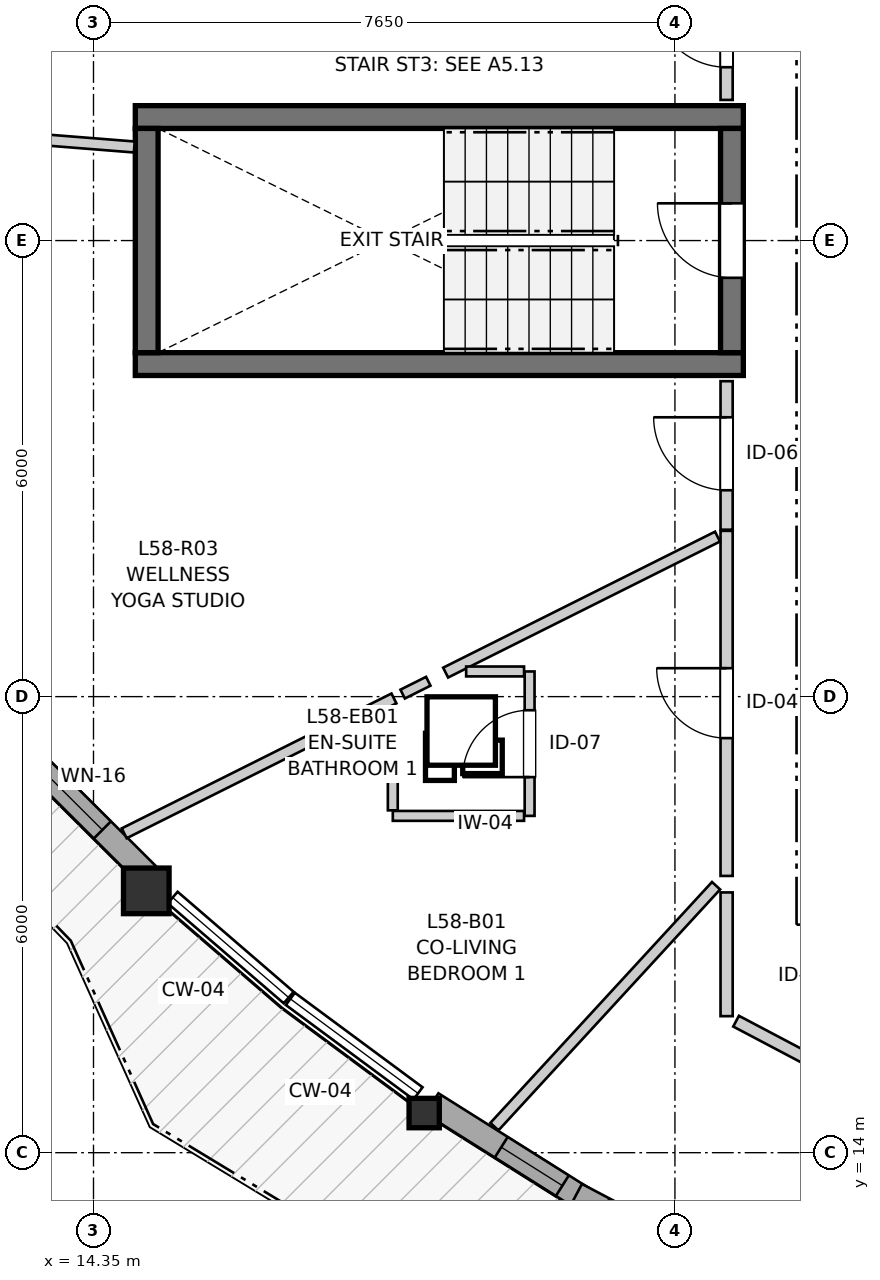
"""IFC4 building model, lengths in metres.
Left out: names, types, materials, properties, quantities, classifications, styles, units other than length and angle.
Written with IfcOpenShell. Run it as: python <this file> out.ifc"""

import sys

from ifc_helpers import new_model, si_unit, direction, frame, frame_2d, origin, origin_2d, place, context, subcontext, project, spatial, rectangle, i_section, extrude, source, transform, mapped, element, fill, save


model = new_model("IFC4")
c1 = context("Model", 3, precision=1e-05, world=origin(), true_north=direction((0.0, 1.0)))
c2 = subcontext(c1, "Body", "Model", "MODEL_VIEW")
j1 = project(units=[si_unit("LENGTHUNIT", "METRE"), si_unit("PLANEANGLEUNIT", "RADIAN")], contexts=[c1])
p1 = place(None, origin())
s1 = spatial("IfcSite", under=j1, at=p1, CompositionType="ELEMENT")
p2 = place(p1, origin())
s2 = spatial("IfcBuilding", under=s1, at=p2, CompositionType="ELEMENT")
p3 = place(p2, frame((0.0, 0.0, 195.6)))
s3 = spatial("IfcBuildingStorey", under=s2, at=p3, CompositionType="ELEMENT", Elevation=195.6)
for number, where, z_axis, x_axis in (
    (1, (14.9, 24.375, 0.0), (0.0, 0.0, 1.0), (1.0, 0.0, 0.0)),
    (2, (22.9, 27.625, 0.0), (0.0, 0.0, 1.0), (-1.0, 0.0, 0.0)),
):
    element("IfcWall", number, at=place(p3, frame(where, z_axis=z_axis, x_axis=x_axis)), inside=s3, PredefinedType="SHEAR", context=c2, shape_type="SweptSolid", body=[
        extrude(rectangle(XDim=8.0, YDim=0.3, at=frame_2d((4.0, 0.0))), origin(), (0.0, 0.0, 1.0), 2.96),
    ])
p4 = place(p3, frame((15.05, 27.475, 0.0), z_axis=(0.0, 0.0, 1.0), x_axis=(0.0, -1.0, 0.0)))
e3 = element("IfcWall", 3, at=p4, inside=s3, PredefinedType="SHEAR", context=c2, shape_type="SweptSolid", body=[
    extrude(rectangle(XDim=2.95, YDim=0.3, at=frame_2d((1.475, 0.0))), origin(), (0.0, 0.0, 1.0), 2.96),
])
p5 = place(p3, frame((22.75, 24.525, 0.0), z_axis=(0.0, 0.0, 1.0), x_axis=(0.0, 1.0, 0.0)))
e4 = element("IfcWall", 4, at=p5, inside=s3, PredefinedType="SHEAR", context=c2, shape_type="SweptSolid", body=[
    extrude(rectangle(XDim=2.95, YDim=0.3, at=frame_2d((1.475, 0.0))), origin(), (0.0, 0.0, 1.0), 2.96),
])
p6 = place(p5, frame((0.985, 0.0, 0.0)))
e5 = element("IfcOpeningElement", 5, at=p6, cuts=e4, PredefinedType="OPENING", context=c2, shape_type="SweptSolid", body=[
    extrude(rectangle(XDim=0.98, YDim=2.15, at=frame_2d((0.49, 1.075))), frame((0.0, 0.16, 0.0), z_axis=(0.0, -1.0, 0.0), x_axis=(1.0, 0.0, 0.0)), (0.0, 0.0, 1.0), 0.32),
])
m1 = source(origin(), c2, "Body", "SweptSolid", [
    extrude(rectangle(XDim=0.6, YDim=0.6, at=origin_2d()), origin(), (0.0, 0.0, 1.0), 2.96),
])
p7 = place(p3, frame((15.044, 17.445, 0.0), z_axis=(0.0, 0.0, 1.0), x_axis=(1.0, 0.0, 0.0)))
e6 = element("IfcColumn", 6, at=p7, inside=s3, PredefinedType="COLUMN", context=c2, shape_type="MappedRepresentation", body=[
    mapped(m1, transform((0.0, 0.0, 0.0), x_axis=(1.0, 0.0, 0.0), y_axis=(0.0, 1.0, 0.0), z_axis=(0.0, 0.0, 1.0), scale=1.0)),
])
m2 = source(origin(), c2, "Body", "SweptSolid", [
    extrude(i_section(OverallWidth=0.398, OverallDepth=0.387, WebThickness=0.019, FlangeThickness=0.03, FilletRadius=0.015, at=origin_2d()), origin(), (0.0, 0.0, 1.0), 2.96),
])
p8 = place(p3, frame((18.701, 14.521, 0.0), z_axis=(0.0, 0.0, 1.0), x_axis=(1.0, 0.0, 0.0)))
e7 = element("IfcColumn", 7, at=p8, inside=s3, PredefinedType="PILASTER", context=c2, shape_type="MappedRepresentation", body=[
    mapped(m2, transform((0.0, 0.0, 0.0), x_axis=(1.0, 0.0, 0.0), y_axis=(0.0, 1.0, 0.0), z_axis=(0.0, 0.0, 1.0), scale=1.0)),
])
p9 = place(p3, frame((13.434, 19.275, 0.0), z_axis=(0.0, 0.0, 1.0), x_axis=(0.708408377073, -0.705802784985, 0.0)))
e8 = element("IfcWall", 8, at=p9, inside=s3, PredefinedType="SOLIDWALL", context=c2, shape_type="SweptSolid", body=[
    extrude(rectangle(XDim=2.343, YDim=0.32, at=frame_2d((1.171, 0.0))), origin(), (0.0, 0.0, 1.0), 2.58),
])
p10 = place(p9, frame((0.308, 0.0, 0.82)))
e9 = element("IfcOpeningElement", 9, at=p10, cuts=e8, PredefinedType="OPENING", context=c2, shape_type="SweptSolid", body=[
    extrude(rectangle(XDim=1.15, YDim=1.2, at=frame_2d((0.575, 0.6))), frame((0.0, 0.17, 0.0), z_axis=(0.0, -1.0, 0.0), x_axis=(1.0, 0.0, 0.0)), (0.0, 0.0, 1.0), 0.34),
])
p11 = place(p3, frame((18.803, 14.646, 0.0), z_axis=(0.0, 0.0, 1.0), x_axis=(0.846390024768, -0.532563541724, 0.0)))
e10 = element("IfcWall", 10, at=p11, inside=s3, PredefinedType="SOLIDWALL", context=c2, shape_type="SweptSolid", body=[
    extrude(rectangle(XDim=2.334, YDim=0.32, at=frame_2d((1.167, 0.0))), origin(), (0.0, 0.0, 1.0), 2.58),
])
p12 = place(p11, frame((1.078, 0.0, 0.82)))
e11 = element("IfcOpeningElement", 11, at=p12, cuts=e10, PredefinedType="OPENING", context=c2, shape_type="SweptSolid", body=[
    extrude(rectangle(XDim=0.95, YDim=1.35, at=frame_2d((0.475, 0.675))), frame((0.0, 0.17, 0.0), z_axis=(0.0, -1.0, 0.0), x_axis=(1.0, 0.0, 0.0)), (0.0, 0.0, 1.0), 0.34),
])
p13 = place(p3, frame((20.702, 13.448, 0.0), z_axis=(0.0, 0.0, 1.0), x_axis=(0.884374859293, -0.466777364758, 0.0)))
e12 = element("IfcWall", 12, at=p13, inside=s3, PredefinedType="SOLIDWALL", context=c2, shape_type="SweptSolid", body=[
    extrude(rectangle(XDim=2.264, YDim=0.32, at=frame_2d((1.132, 0.0))), origin(), (0.0, 0.0, 1.0), 2.58),
])
p14 = place(p13, frame((0.412, 0.0, 0.82)))
e13 = element("IfcOpeningElement", 13, at=p14, cuts=e12, PredefinedType="OPENING", context=c2, shape_type="SweptSolid", body=[
    extrude(rectangle(XDim=1.45, YDim=1.25, at=frame_2d((0.725, 0.625))), frame((0.0, 0.17, 0.0), z_axis=(0.0, -1.0, 0.0), x_axis=(1.0, 0.0, 0.0)), (0.0, 0.0, 1.0), 0.34),
])
p15 = place(p3, frame((22.68, 17.641, 0.0), z_axis=(0.0, 0.0, 1.0), x_axis=(0.0, 1.0, 0.0)))
e14 = element("IfcWall", 14, at=p15, inside=s3, PredefinedType="PARTITIONING", context=c2, shape_type="SweptSolid", body=[
    extrude(rectangle(XDim=4.54, YDim=0.16, at=frame_2d((2.27, 0.0))), origin(), (0.0, 0.0, 1.0), 2.96),
])
p16 = place(p15, frame((1.813, 0.0, 0.0)))
e15 = element("IfcOpeningElement", 15, at=p16, cuts=e14, PredefinedType="OPENING", context=c2, shape_type="SweptSolid", body=[
    extrude(rectangle(XDim=0.92, YDim=2.1, at=frame_2d((0.46, 1.05))), frame((0.0, 0.09, 0.0), z_axis=(0.0, -1.0, 0.0), x_axis=(1.0, 0.0, 0.0)), (0.0, 0.0, 1.0), 0.18),
])
p17 = place(p3, frame((22.68, 22.196, 0.0), z_axis=(0.0, 0.0, 1.0), x_axis=(0.0, 1.0, 0.0)))
e16 = element("IfcWall", 16, at=p17, inside=s3, PredefinedType="PARTITIONING", context=c2, shape_type="SweptSolid", body=[
    extrude(rectangle(XDim=1.954, YDim=0.16, at=frame_2d((0.977, 0.0))), origin(), (0.0, 0.0, 1.0), 2.96),
])
p18 = place(p17, frame((0.519, 0.0, 0.0)))
e17 = element("IfcOpeningElement", 17, at=p18, cuts=e16, PredefinedType="OPENING", context=c2, shape_type="SweptSolid", body=[
    extrude(rectangle(XDim=0.96, YDim=2.1, at=frame_2d((0.48, 1.05))), frame((0.0, 0.09, 0.0), z_axis=(0.0, -1.0, 0.0), x_axis=(1.0, 0.0, 0.0)), (0.0, 0.0, 1.0), 0.18),
])
p19 = place(p3, frame((20.088, 18.431, 0.0), z_axis=(0.0, 0.0, 1.0), x_axis=(0.0, 1.0, 0.0)))
e18 = element("IfcWall", 18, at=p19, inside=s3, PredefinedType="PARTITIONING", context=c2, shape_type="SweptSolid", body=[
    extrude(rectangle(XDim=1.9, YDim=0.13, at=frame_2d((0.95, 0.0))), origin(), (0.0, 0.0, 1.0), 2.96),
])
p20 = place(p19, frame((0.51, 0.0, 0.0)))
e19 = element("IfcOpeningElement", 19, at=p20, cuts=e18, PredefinedType="OPENING", context=c2, shape_type="SweptSolid", body=[
    extrude(rectangle(XDim=0.88, YDim=2.05, at=frame_2d((0.44, 1.025))), frame((0.0, 0.075, 0.0), z_axis=(0.0, -1.0, 0.0), x_axis=(1.0, 0.0, 0.0)), (0.0, 0.0, 1.0), 0.15),
])
p21 = place(p3, frame((22.68, 27.85, 0.0), z_axis=(0.0, 0.0, 1.0), x_axis=(0.0, 1.0, 0.0)))
e20 = element("IfcWall", 20, at=p21, inside=s3, PredefinedType="PARTITIONING", context=c2, shape_type="SweptSolid", body=[
    extrude(rectangle(XDim=1.731, YDim=0.16, at=frame_2d((0.865, 0.0))), origin(), (0.0, 0.0, 1.0), 2.96),
])
p22 = place(p21, frame((0.43, 0.0, 0.0)))
e21 = element("IfcOpeningElement", 21, at=p22, cuts=e20, PredefinedType="OPENING", context=c2, shape_type="SweptSolid", body=[
    extrude(rectangle(XDim=0.96, YDim=2.1, at=frame_2d((0.48, 1.05))), frame((0.0, 0.09, 0.0), z_axis=(0.0, -1.0, 0.0), x_axis=(1.0, 0.0, 0.0)), (0.0, 0.0, 1.0), 0.18),
])
p23 = place(p3, frame((9.473, 27.661, 0.0), z_axis=(0.0, 0.0, 1.0), x_axis=(0.996864548282, -0.079126938392, 0.0)))
e22 = element("IfcWall", 22, at=p23, inside=s3, PredefinedType="PARTITIONING", context=c2, shape_type="SweptSolid", body=[
    extrude(rectangle(XDim=5.43, YDim=0.145, at=frame_2d((2.715, 0.0))), origin(), (0.0, 0.0, 1.0), 2.96),
])
p24 = place(p3, frame((19.625, 14.343, 0.0), z_axis=(0.0, 0.0, 1.0), x_axis=(0.677104421975, 0.735886949023, 0.0)))
e23 = element("IfcWall", 23, at=p24, inside=s3, PredefinedType="PARTITIONING", context=c2, shape_type="SweptSolid", body=[
    extrude(rectangle(XDim=4.307, YDim=0.145, at=frame_2d((2.153, 0.0))), origin(), (0.0, 0.0, 1.0), 2.96),
])
p25 = place(p3, frame((18.983, 20.316, 0.0), z_axis=(0.0, 0.0, 1.0), x_axis=(0.894366146285, 0.447335664104, 0.0)))
e24 = element("IfcWall", 24, at=p25, inside=s3, PredefinedType="PARTITIONING", context=c2, shape_type="SweptSolid", body=[
    extrude(rectangle(XDim=4.0, YDim=0.145, at=frame_2d((2.0, 0.0))), origin(), (0.0, 0.0, 1.0), 2.96),
])
p26 = place(p3, frame((14.754, 18.202, 0.0), z_axis=(0.0, 0.0, 1.0), x_axis=(0.894464106055, 0.44713975777, 0.0)))
e25 = element("IfcWall", 25, at=p26, inside=s3, PredefinedType="PARTITIONING", context=c2, shape_type="SweptSolid", body=[
    extrude(rectangle(XDim=3.968, YDim=0.145, at=frame_2d((1.984, 0.0))), origin(), (0.0, 0.0, 1.0), 2.96),
])
p27 = place(p3, frame((22.68, 15.796, 0.0), z_axis=(0.0, 0.0, 1.0), x_axis=(0.0, 1.0, 0.0)))
e26 = element("IfcWall", 26, at=p27, inside=s3, PredefinedType="PARTITIONING", context=c2, shape_type="SweptSolid", body=[
    extrude(rectangle(XDim=1.628, YDim=0.16, at=frame_2d((0.814, 0.0))), origin(), (0.0, 0.0, 1.0), 2.96),
])
p28 = place(p3, frame((18.288, 18.431, 0.0), z_axis=(0.0, 0.0, 1.0), x_axis=(1.0, 0.0, 0.0)))
e27 = element("IfcWall", 27, at=p28, inside=s3, PredefinedType="PARTITIONING", context=c2, shape_type="SweptSolid", body=[
    extrude(rectangle(XDim=1.727, YDim=0.13, at=frame_2d((0.863, 0.0))), origin(), (0.0, 0.0, 1.0), 2.96),
])
p29 = place(p3, frame((22.804, 15.73, 0.0), z_axis=(0.0, 0.0, 1.0), x_axis=(0.884376976103, -0.466773354143, 0.0)))
e28 = element("IfcWall", 28, at=p29, inside=s3, PredefinedType="PARTITIONING", context=c2, shape_type="SweptSolid", body=[
    extrude(rectangle(XDim=1.44, YDim=0.16, at=frame_2d((0.72, 0.0))), origin(), (0.0, 0.0, 1.0), 2.96),
])
p30 = place(p3, frame((18.288, 18.504, 0.0), z_axis=(0.0, 0.0, 1.0), x_axis=(0.0, 1.0, 0.0)))
e29 = element("IfcWall", 29, at=p30, inside=s3, PredefinedType="PARTITIONING", context=c2, shape_type="SweptSolid", body=[
    extrude(rectangle(XDim=1.344, YDim=0.13, at=frame_2d((0.672, 0.0))), origin(), (0.0, 0.0, 1.0), 2.96),
])
p31 = place(p3, frame((19.253, 20.331, 0.0), z_axis=(0.0, 0.0, 1.0), x_axis=(1.0, 0.0, 0.0)))
e30 = element("IfcWall", 30, at=p31, inside=s3, PredefinedType="PARTITIONING", context=c2, shape_type="SweptSolid", body=[
    extrude(rectangle(XDim=0.762, YDim=0.13, at=frame_2d((0.381, 0.0))), origin(), (0.0, 0.0, 1.0), 2.96),
])
p32 = place(p3, frame((18.417, 20.033, 0.0), z_axis=(0.0, 0.0, 1.0), x_axis=(0.894427191, 0.4472135955, 0.0)))
e31 = element("IfcWall", 31, at=p32, inside=s3, PredefinedType="PARTITIONING", context=c2, shape_type="SweptSolid", body=[
    extrude(rectangle(XDim=0.377, YDim=0.13, at=frame_2d((0.188, 0.0))), origin(), (0.0, 0.0, 1.0), 2.96),
])
m3 = source(origin(), c2, "Body", "SweptSolid", [
    extrude(rectangle(XDim=1.15, YDim=1.2, at=frame_2d((0.575, 0.6))), frame((0.0, 0.03, 0.0), z_axis=(0.0, -1.0, 0.0), x_axis=(1.0, 0.0, 0.0)), (0.0, 0.0, 1.0), 0.06),
])
p33 = place(p10, origin())
e32 = element("IfcWindow", 32, at=p33, inside=s3, PartitioningType="SINGLE_PANEL", PredefinedType="WINDOW", context=c2, shape_type="MappedRepresentation", body=[
    mapped(m3, transform((0.0, 0.0, 0.0), x_axis=(1.0, 0.0, 0.0), y_axis=(0.0, 1.0, 0.0), z_axis=(0.0, 0.0, 1.0), scale=1.0)),
])
fill(e9, e32)
m4 = source(origin(), c2, "Body", "SweptSolid", [
    extrude(rectangle(XDim=0.95, YDim=1.35, at=frame_2d((0.475, 0.675))), frame((0.0, 0.03, 0.0), z_axis=(0.0, -1.0, 0.0), x_axis=(1.0, 0.0, 0.0)), (0.0, 0.0, 1.0), 0.06),
])
p34 = place(p12, origin())
e33 = element("IfcWindow", 33, at=p34, inside=s3, PartitioningType="SINGLE_PANEL", PredefinedType="WINDOW", context=c2, shape_type="MappedRepresentation", body=[
    mapped(m4, transform((0.0, 0.0, 0.0), x_axis=(1.0, 0.0, 0.0), y_axis=(0.0, 1.0, 0.0), z_axis=(0.0, 0.0, 1.0), scale=1.0)),
])
fill(e11, e33)
m5 = source(origin(), c2, "Body", "SweptSolid", [
    extrude(rectangle(XDim=0.98, YDim=2.15, at=frame_2d((0.49, 1.075))), frame((0.0, 0.025, 0.0), z_axis=(0.0, -1.0, 0.0), x_axis=(1.0, 0.0, 0.0)), (0.0, 0.0, 1.0), 0.05),
])
p35 = place(p6, origin())
e34 = element("IfcDoor", 34, at=p35, inside=s3, OperationType="SINGLE_SWING_RIGHT", PredefinedType="DOOR", context=c2, shape_type="MappedRepresentation", body=[
    mapped(m5, transform((0.0, 0.0, 0.0), x_axis=(1.0, 0.0, 0.0), y_axis=(0.0, 1.0, 0.0), z_axis=(0.0, 0.0, 1.0), scale=1.0)),
])
fill(e5, e34)
m6 = source(origin(), c2, "Body", "SweptSolid", [
    extrude(rectangle(XDim=0.92, YDim=2.1, at=frame_2d((0.46, 1.05))), frame((0.0, 0.025, 0.0), z_axis=(0.0, -1.0, 0.0), x_axis=(1.0, 0.0, 0.0)), (0.0, 0.0, 1.0), 0.05),
])
p36 = place(p16, origin())
e35 = element("IfcDoor", 35, at=p36, inside=s3, OperationType="SINGLE_SWING_RIGHT", PredefinedType="DOOR", context=c2, shape_type="MappedRepresentation", body=[
    mapped(m6, transform((0.0, 0.0, 0.0), x_axis=(1.0, 0.0, 0.0), y_axis=(0.0, 1.0, 0.0), z_axis=(0.0, 0.0, 1.0), scale=1.0)),
])
fill(e15, e35)
m7 = source(origin(), c2, "Body", "SweptSolid", [
    extrude(rectangle(XDim=0.96, YDim=2.1, at=frame_2d((0.48, 1.05))), frame((0.0, 0.025, 0.0), z_axis=(0.0, -1.0, 0.0), x_axis=(1.0, 0.0, 0.0)), (0.0, 0.0, 1.0), 0.05),
])
p37 = place(p18, origin())
e36 = element("IfcDoor", 36, at=p37, inside=s3, OperationType="SINGLE_SWING_RIGHT", PredefinedType="DOOR", context=c2, shape_type="MappedRepresentation", body=[
    mapped(m7, transform((0.0, 0.0, 0.0), x_axis=(1.0, 0.0, 0.0), y_axis=(0.0, 1.0, 0.0), z_axis=(0.0, 0.0, 1.0), scale=1.0)),
])
fill(e17, e36)
m8 = source(origin(), c2, "Body", "SweptSolid", [
    extrude(rectangle(XDim=0.88, YDim=2.05, at=frame_2d((0.44, 1.025))), frame((0.0, 0.025, 0.0), z_axis=(0.0, -1.0, 0.0), x_axis=(1.0, 0.0, 0.0)), (0.0, 0.0, 1.0), 0.05),
])
p38 = place(p20, origin())
e37 = element("IfcDoor", 37, at=p38, inside=s3, OperationType="SINGLE_SWING_LEFT", PredefinedType="DOOR", context=c2, shape_type="MappedRepresentation", body=[
    mapped(m8, transform((0.0, 0.0, 0.0), x_axis=(1.0, 0.0, 0.0), y_axis=(0.0, 1.0, 0.0), z_axis=(0.0, 0.0, 1.0), scale=1.0)),
])
fill(e19, e37)
p39 = place(p22, origin())
e38 = element("IfcDoor", 38, at=p39, inside=s3, OperationType="SINGLE_SWING_RIGHT", PredefinedType="DOOR", context=c2, shape_type="MappedRepresentation", body=[
    mapped(m7, transform((0.0, 0.0, 0.0), x_axis=(1.0, 0.0, 0.0), y_axis=(0.0, 1.0, 0.0), z_axis=(0.0, 0.0, 1.0), scale=1.0)),
])
fill(e21, e38)
save(model, sys.argv[1])
